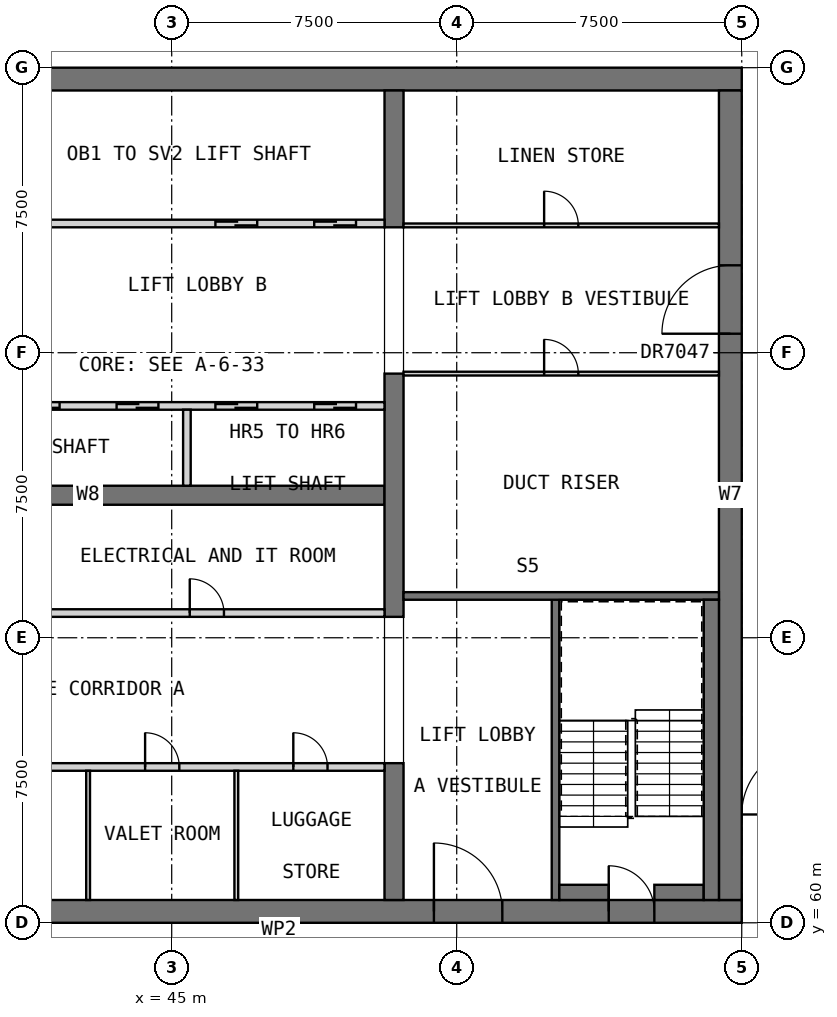
"""IFC4 building model, lengths in metres.
Left out: names, types, materials, properties, quantities, classifications, styles, units other than length and angle.
Written with IfcOpenShell. Run it as: python <this file> out.ifc"""

import sys

from ifc_helpers import new_model, si_unit, direction, frame, frame_2d, origin, place, context, subcontext, project, spatial, rectangle, extrude, element, fill, save


model = new_model("IFC4")
c1 = context("Model", 3, precision=1e-05, world=origin(), true_north=direction((0.0, 1.0)))
c2 = subcontext(c1, "Body", "Model", "MODEL_VIEW")
j1 = project(units=[si_unit("LENGTHUNIT", "METRE"), si_unit("PLANEANGLEUNIT", "RADIAN")], contexts=[c1])
p1 = place(None, origin())
s1 = spatial("IfcSite", under=j1, at=p1, CompositionType="ELEMENT")
p2 = place(p1, origin())
s2 = spatial("IfcBuilding", under=s1, at=p2, CompositionType="ELEMENT")
p3 = place(p2, frame((0.0, 0.0, 230.2)))
s3 = spatial("IfcBuildingStorey", under=s2, at=p3, CompositionType="ELEMENT", Elevation=230.2)
p4 = place(p3, frame((30.0, 60.3, 0.0), z_axis=(0.0, 0.0, 1.0), x_axis=(1.0, 0.0, 0.0)))
e1 = element("IfcWall", 1, at=p4, inside=s3, PredefinedType="SHEAR", context=c2, shape_type="SweptSolid", body=[
    extrude(rectangle(XDim=30.0, YDim=0.6, at=frame_2d((15.0, 0.0))), origin(), (0.0, 0.0, 1.0), 3.5),
])
p5 = place(p4, frame((21.9, 0.0, 0.0)))
e2 = element("IfcOpeningElement", 2, at=p5, cuts=e1, PredefinedType="OPENING", context=c2, shape_type="SweptSolid", body=[
    extrude(rectangle(XDim=1.8, YDim=2.1, at=frame_2d((0.9, 1.05))), frame((0.0, 0.31, 0.0), z_axis=(0.0, -1.0, 0.0), x_axis=(1.0, 0.0, 0.0)), (0.0, 0.0, 1.0), 0.62),
])
p6 = place(p4, frame((26.5, 0.0, 0.0)))
e3 = element("IfcOpeningElement", 3, at=p6, cuts=e1, PredefinedType="OPENING", context=c2, shape_type="SweptSolid", body=[
    extrude(rectangle(XDim=1.2, YDim=2.1, at=frame_2d((0.6, 1.05))), frame((0.0, 0.31, 0.0), z_axis=(0.0, -1.0, 0.0), x_axis=(1.0, 0.0, 0.0)), (0.0, 0.0, 1.0), 0.62),
])
p7 = place(p3, frame((30.0, 82.2, 0.0), z_axis=(0.0, 0.0, 1.0), x_axis=(1.0, 0.0, 0.0)))
e4 = element("IfcWall", 4, at=p7, inside=s3, PredefinedType="SHEAR", context=c2, shape_type="SweptSolid", body=[
    extrude(rectangle(XDim=30.0, YDim=0.6, at=frame_2d((15.0, 0.0))), origin(), (0.0, 0.0, 1.0), 3.5),
])
p8 = place(p3, frame((59.7, 60.6, 0.0), z_axis=(0.0, 0.0, 1.0), x_axis=(0.0, 1.0, 0.0)))
e5 = element("IfcWall", 5, at=p8, inside=s3, PredefinedType="SHEAR", context=c2, shape_type="SweptSolid", body=[
    extrude(rectangle(XDim=21.3, YDim=0.6, at=frame_2d((10.65, 0.0))), origin(), (0.0, 0.0, 1.0), 3.5),
])
p9 = place(p8, frame((14.9, 0.0, 0.0)))
e6 = element("IfcOpeningElement", 6, at=p9, cuts=e5, PredefinedType="OPENING", context=c2, shape_type="SweptSolid", body=[
    extrude(rectangle(XDim=1.8, YDim=2.1, at=frame_2d((0.9, 1.05))), frame((0.0, 0.31, 0.0), z_axis=(0.0, -1.0, 0.0), x_axis=(1.0, 0.0, 0.0)), (0.0, 0.0, 1.0), 0.62),
])
p10 = place(p3, frame((35.0, 71.25, 0.0), z_axis=(0.0, 0.0, 1.0), x_axis=(1.0, 0.0, 0.0)))
e7 = element("IfcWall", 7, at=p10, inside=s3, PredefinedType="SHEAR", context=c2, shape_type="SweptSolid", body=[
    extrude(rectangle(XDim=15.6, YDim=0.5, at=frame_2d((7.8, 0.0))), origin(), (0.0, 0.0, 1.0), 3.5),
])
p11 = place(p3, frame((50.85, 60.6, 0.0), z_axis=(0.0, 0.0, 1.0), x_axis=(0.0, 1.0, 0.0)))
e8 = element("IfcWall", 8, at=p11, inside=s3, PredefinedType="SHEAR", context=c2, shape_type="SweptSolid", body=[
    extrude(rectangle(XDim=3.6, YDim=0.5, at=frame_2d((1.8, 0.0))), origin(), (0.0, 0.0, 1.0), 3.5),
])
p12 = place(p3, frame((50.85, 68.05, 0.0), z_axis=(0.0, 0.0, 1.0), x_axis=(0.0, 1.0, 0.0)))
e9 = element("IfcWall", 9, at=p12, inside=s3, PredefinedType="SHEAR", context=c2, shape_type="SweptSolid", body=[
    extrude(rectangle(XDim=6.4, YDim=0.5, at=frame_2d((3.2, 0.0))), origin(), (0.0, 0.0, 1.0), 3.5),
])
p13 = place(p3, frame((50.85, 78.3, 0.0), z_axis=(0.0, 0.0, 1.0), x_axis=(0.0, 1.0, 0.0)))
e10 = element("IfcWall", 10, at=p13, inside=s3, PredefinedType="SHEAR", context=c2, shape_type="SweptSolid", body=[
    extrude(rectangle(XDim=3.6, YDim=0.5, at=frame_2d((1.8, 0.0))), origin(), (0.0, 0.0, 1.0), 3.5),
])
p14 = place(p3, frame((35.0, 64.1, 0.0), z_axis=(0.0, 0.0, 1.0), x_axis=(1.0, 0.0, 0.0)))
e11 = element("IfcWall", 11, at=p14, inside=s3, PredefinedType="PARTITIONING", context=c2, shape_type="SweptSolid", body=[
    extrude(rectangle(XDim=15.6, YDim=0.2, at=frame_2d((7.8, 0.0))), origin(), (0.0, 0.0, 1.0), 3.25),
])
p15 = place(p14, frame((1.5, 0.0, 0.0)))
e12 = element("IfcOpeningElement", 12, at=p15, cuts=e11, PredefinedType="OPENING", context=c2, shape_type="SweptSolid", body=[
    extrude(rectangle(XDim=0.9, YDim=2.1, at=frame_2d((0.45, 1.05))), frame((0.0, 0.11, 0.0), z_axis=(0.0, -1.0, 0.0), x_axis=(1.0, 0.0, 0.0)), (0.0, 0.0, 1.0), 0.22),
])
p16 = place(p14, frame((5.4, 0.0, 0.0)))
e13 = element("IfcOpeningElement", 13, at=p16, cuts=e11, PredefinedType="OPENING", context=c2, shape_type="SweptSolid", body=[
    extrude(rectangle(XDim=0.9, YDim=2.1, at=frame_2d((0.45, 1.05))), frame((0.0, 0.11, 0.0), z_axis=(0.0, -1.0, 0.0), x_axis=(1.0, 0.0, 0.0)), (0.0, 0.0, 1.0), 0.22),
])
p17 = place(p14, frame((9.3, 0.0, 0.0)))
e14 = element("IfcOpeningElement", 14, at=p17, cuts=e11, PredefinedType="OPENING", context=c2, shape_type="SweptSolid", body=[
    extrude(rectangle(XDim=0.9, YDim=2.1, at=frame_2d((0.45, 1.05))), frame((0.0, 0.11, 0.0), z_axis=(0.0, -1.0, 0.0), x_axis=(1.0, 0.0, 0.0)), (0.0, 0.0, 1.0), 0.22),
])
p18 = place(p14, frame((13.2, 0.0, 0.0)))
e15 = element("IfcOpeningElement", 15, at=p18, cuts=e11, PredefinedType="OPENING", context=c2, shape_type="SweptSolid", body=[
    extrude(rectangle(XDim=0.9, YDim=2.1, at=frame_2d((0.45, 1.05))), frame((0.0, 0.11, 0.0), z_axis=(0.0, -1.0, 0.0), x_axis=(1.0, 0.0, 0.0)), (0.0, 0.0, 1.0), 0.22),
])
for number, where, z_axis, x_axis in (
    (16, (42.8, 60.6, 0.0), (0.0, 0.0, 1.0), (0.0, 1.0, 0.0)),
    (17, (46.7, 60.6, 0.0), (0.0, 0.0, 1.0), (0.0, 1.0, 0.0)),
):
    element("IfcWall", number, at=place(p3, frame(where, z_axis=z_axis, x_axis=x_axis)), inside=s3, PredefinedType="PARTITIONING", context=c2, shape_type="SweptSolid", body=[
        extrude(rectangle(XDim=3.4, YDim=0.1, at=frame_2d((1.7, 0.0))), origin(), (0.0, 0.0, 1.0), 3.25),
    ])
p19 = place(p3, frame((35.0, 68.15, 0.0), z_axis=(0.0, 0.0, 1.0), x_axis=(1.0, 0.0, 0.0)))
e18 = element("IfcWall", 18, at=p19, inside=s3, PredefinedType="PARTITIONING", context=c2, shape_type="SweptSolid", body=[
    extrude(rectangle(XDim=15.6, YDim=0.2, at=frame_2d((7.8, 0.0))), origin(), (0.0, 0.0, 1.0), 3.25),
])
p20 = place(p19, frame((2.675, 0.0, 0.0)))
e19 = element("IfcOpeningElement", 19, at=p20, cuts=e18, PredefinedType="OPENING", context=c2, shape_type="SweptSolid", body=[
    extrude(rectangle(XDim=0.9, YDim=2.1, at=frame_2d((0.45, 1.05))), frame((0.0, 0.11, 0.0), z_axis=(0.0, -1.0, 0.0), x_axis=(1.0, 0.0, 0.0)), (0.0, 0.0, 1.0), 0.22),
])
p21 = place(p19, frame((10.475, 0.0, 0.0)))
e20 = element("IfcOpeningElement", 20, at=p21, cuts=e18, PredefinedType="OPENING", context=c2, shape_type="SweptSolid", body=[
    extrude(rectangle(XDim=0.9, YDim=2.1, at=frame_2d((0.45, 1.05))), frame((0.0, 0.11, 0.0), z_axis=(0.0, -1.0, 0.0), x_axis=(1.0, 0.0, 0.0)), (0.0, 0.0, 1.0), 0.22),
])
p22 = place(p3, frame((35.0, 73.6, 0.0), z_axis=(0.0, 0.0, 1.0), x_axis=(1.0, 0.0, 0.0)))
e21 = element("IfcWall", 21, at=p22, inside=s3, PredefinedType="SOLIDWALL", context=c2, shape_type="SweptSolid", body=[
    extrude(rectangle(XDim=15.6, YDim=0.2, at=frame_2d((7.8, 0.0))), origin(), (0.0, 0.0, 1.0), 3.5),
])
p23 = place(p22, frame((0.75, 0.0, 0.0)))
e22 = element("IfcOpeningElement", 22, at=p23, cuts=e21, PredefinedType="OPENING", context=c2, shape_type="SweptSolid", body=[
    extrude(rectangle(XDim=1.1, YDim=2.1, at=frame_2d((0.55, 1.05))), frame((0.0, 0.11, 0.0), z_axis=(0.0, -1.0, 0.0), x_axis=(1.0, 0.0, 0.0)), (0.0, 0.0, 1.0), 0.22),
])
p24 = place(p22, frame((3.35, 0.0, 0.0)))
e23 = element("IfcOpeningElement", 23, at=p24, cuts=e21, PredefinedType="OPENING", context=c2, shape_type="SweptSolid", body=[
    extrude(rectangle(XDim=1.1, YDim=2.1, at=frame_2d((0.55, 1.05))), frame((0.0, 0.11, 0.0), z_axis=(0.0, -1.0, 0.0), x_axis=(1.0, 0.0, 0.0)), (0.0, 0.0, 1.0), 0.22),
])
p25 = place(p22, frame((5.95, 0.0, 0.0)))
e24 = element("IfcOpeningElement", 24, at=p25, cuts=e21, PredefinedType="OPENING", context=c2, shape_type="SweptSolid", body=[
    extrude(rectangle(XDim=1.1, YDim=2.1, at=frame_2d((0.55, 1.05))), frame((0.0, 0.11, 0.0), z_axis=(0.0, -1.0, 0.0), x_axis=(1.0, 0.0, 0.0)), (0.0, 0.0, 1.0), 0.22),
])
p26 = place(p22, frame((8.55, 0.0, 0.0)))
e25 = element("IfcOpeningElement", 25, at=p26, cuts=e21, PredefinedType="OPENING", context=c2, shape_type="SweptSolid", body=[
    extrude(rectangle(XDim=1.1, YDim=2.1, at=frame_2d((0.55, 1.05))), frame((0.0, 0.11, 0.0), z_axis=(0.0, -1.0, 0.0), x_axis=(1.0, 0.0, 0.0)), (0.0, 0.0, 1.0), 0.22),
])
p27 = place(p22, frame((11.15, 0.0, 0.0)))
e26 = element("IfcOpeningElement", 26, at=p27, cuts=e21, PredefinedType="OPENING", context=c2, shape_type="SweptSolid", body=[
    extrude(rectangle(XDim=1.1, YDim=2.1, at=frame_2d((0.55, 1.05))), frame((0.0, 0.11, 0.0), z_axis=(0.0, -1.0, 0.0), x_axis=(1.0, 0.0, 0.0)), (0.0, 0.0, 1.0), 0.22),
])
p28 = place(p22, frame((13.75, 0.0, 0.0)))
e27 = element("IfcOpeningElement", 27, at=p28, cuts=e21, PredefinedType="OPENING", context=c2, shape_type="SweptSolid", body=[
    extrude(rectangle(XDim=1.1, YDim=2.1, at=frame_2d((0.55, 1.05))), frame((0.0, 0.11, 0.0), z_axis=(0.0, -1.0, 0.0), x_axis=(1.0, 0.0, 0.0)), (0.0, 0.0, 1.0), 0.22),
])
p29 = place(p3, frame((45.4, 71.5, 0.0), z_axis=(0.0, 0.0, 1.0), x_axis=(0.0, 1.0, 0.0)))
e28 = element("IfcWall", 28, at=p29, inside=s3, PredefinedType="SOLIDWALL", context=c2, shape_type="SweptSolid", body=[
    extrude(rectangle(XDim=2.0, YDim=0.2, at=frame_2d((1.0, 0.0))), origin(), (0.0, 0.0, 1.0), 3.5),
])
p30 = place(p3, frame((35.0, 78.4, 0.0), z_axis=(0.0, 0.0, 1.0), x_axis=(1.0, 0.0, 0.0)))
e29 = element("IfcWall", 29, at=p30, inside=s3, PredefinedType="SOLIDWALL", context=c2, shape_type="SweptSolid", body=[
    extrude(rectangle(XDim=15.6, YDim=0.2, at=frame_2d((7.8, 0.0))), origin(), (0.0, 0.0, 1.0), 3.5),
])
p31 = place(p30, frame((0.75, 0.0, 0.0)))
e30 = element("IfcOpeningElement", 30, at=p31, cuts=e29, PredefinedType="OPENING", context=c2, shape_type="SweptSolid", body=[
    extrude(rectangle(XDim=1.1, YDim=2.1, at=frame_2d((0.55, 1.05))), frame((0.0, 0.11, 0.0), z_axis=(0.0, -1.0, 0.0), x_axis=(1.0, 0.0, 0.0)), (0.0, 0.0, 1.0), 0.22),
])
p32 = place(p30, frame((3.35, 0.0, 0.0)))
e31 = element("IfcOpeningElement", 31, at=p32, cuts=e29, PredefinedType="OPENING", context=c2, shape_type="SweptSolid", body=[
    extrude(rectangle(XDim=1.1, YDim=2.1, at=frame_2d((0.55, 1.05))), frame((0.0, 0.11, 0.0), z_axis=(0.0, -1.0, 0.0), x_axis=(1.0, 0.0, 0.0)), (0.0, 0.0, 1.0), 0.22),
])
p33 = place(p30, frame((11.15, 0.0, 0.0)))
e32 = element("IfcOpeningElement", 32, at=p33, cuts=e29, PredefinedType="OPENING", context=c2, shape_type="SweptSolid", body=[
    extrude(rectangle(XDim=1.1, YDim=2.1, at=frame_2d((0.55, 1.05))), frame((0.0, 0.11, 0.0), z_axis=(0.0, -1.0, 0.0), x_axis=(1.0, 0.0, 0.0)), (0.0, 0.0, 1.0), 0.22),
])
p34 = place(p30, frame((13.75, 0.0, 0.0)))
e33 = element("IfcOpeningElement", 33, at=p34, cuts=e29, PredefinedType="OPENING", context=c2, shape_type="SweptSolid", body=[
    extrude(rectangle(XDim=1.1, YDim=2.1, at=frame_2d((0.55, 1.05))), frame((0.0, 0.11, 0.0), z_axis=(0.0, -1.0, 0.0), x_axis=(1.0, 0.0, 0.0)), (0.0, 0.0, 1.0), 0.22),
])
p35 = place(p3, frame((55.1, 60.6, 0.0), z_axis=(0.0, 0.0, 1.0), x_axis=(0.0, 1.0, 0.0)))
e34 = element("IfcWall", 34, at=p35, inside=s3, PredefinedType="SOLIDWALL", context=c2, shape_type="SweptSolid", body=[
    extrude(rectangle(XDim=8.0, YDim=0.2, at=frame_2d((4.0, 0.0))), origin(), (0.0, 0.0, 1.0), 3.25),
])
p36 = place(p3, frame((51.1, 68.6, 0.0), z_axis=(0.0, 0.0, 1.0), x_axis=(1.0, 0.0, 0.0)))
e35 = element("IfcWall", 35, at=p36, inside=s3, PredefinedType="SOLIDWALL", context=c2, shape_type="SweptSolid", body=[
    extrude(rectangle(XDim=8.3, YDim=0.2, at=frame_2d((4.15, 0.0))), origin(), (0.0, 0.0, 1.0), 3.25),
])
for number, where, z_axis, x_axis in (
    (36, (55.2, 60.8, 0.0), (0.0, 0.0, 1.0), (1.0, 0.0, 0.0)),
    (37, (57.7, 60.8, 0.0), (0.0, 0.0, 1.0), (1.0, 0.0, 0.0)),
):
    element("IfcWall", number, at=place(p3, frame(where, z_axis=z_axis, x_axis=x_axis)), inside=s3, PredefinedType="SOLIDWALL", context=c2, shape_type="SweptSolid", body=[
        extrude(rectangle(XDim=1.3, YDim=0.4, at=frame_2d((0.65, 0.0))), origin(), (0.0, 0.0, 1.0), 3.25),
    ])
p37 = place(p3, frame((59.2, 60.6, 0.0), z_axis=(0.0, 0.0, 1.0), x_axis=(0.0, 1.0, 0.0)))
e38 = element("IfcWall", 38, at=p37, inside=s3, PredefinedType="SOLIDWALL", context=c2, shape_type="SweptSolid", body=[
    extrude(rectangle(XDim=7.9, YDim=0.4, at=frame_2d((3.95, 0.0))), origin(), (0.0, 0.0, 1.0), 3.25),
])
p38 = place(p3, frame((51.1, 74.45, 0.0), z_axis=(0.0, 0.0, 1.0), x_axis=(1.0, 0.0, 0.0)))
e39 = element("IfcWall", 39, at=p38, inside=s3, PredefinedType="PARTITIONING", context=c2, shape_type="SweptSolid", body=[
    extrude(rectangle(XDim=8.3, YDim=0.1, at=frame_2d((4.15, 0.0))), origin(), (0.0, 0.0, 1.0), 3.25),
])
p39 = place(p38, frame((3.7, 0.0, 0.0)))
e40 = element("IfcOpeningElement", 40, at=p39, cuts=e39, PredefinedType="OPENING", context=c2, shape_type="SweptSolid", body=[
    extrude(rectangle(XDim=0.9, YDim=2.1, at=frame_2d((0.45, 1.05))), frame((0.0, 0.06, 0.0), z_axis=(0.0, -1.0, 0.0), x_axis=(1.0, 0.0, 0.0)), (0.0, 0.0, 1.0), 0.12),
])
p40 = place(p3, frame((51.1, 78.35, 0.0), z_axis=(0.0, 0.0, 1.0), x_axis=(1.0, 0.0, 0.0)))
e41 = element("IfcWall", 41, at=p40, inside=s3, PredefinedType="PARTITIONING", context=c2, shape_type="SweptSolid", body=[
    extrude(rectangle(XDim=8.3, YDim=0.1, at=frame_2d((4.15, 0.0))), origin(), (0.0, 0.0, 1.0), 3.25),
])
p41 = place(p40, frame((3.7, 0.0, 0.0)))
e42 = element("IfcOpeningElement", 42, at=p41, cuts=e41, PredefinedType="OPENING", context=c2, shape_type="SweptSolid", body=[
    extrude(rectangle(XDim=0.9, YDim=2.1, at=frame_2d((0.45, 1.05))), frame((0.0, 0.06, 0.0), z_axis=(0.0, -1.0, 0.0), x_axis=(1.0, 0.0, 0.0)), (0.0, 0.0, 1.0), 0.12),
])
p42 = place(p17, origin())
e43 = element("IfcDoor", 43, at=p42, inside=s3, OperationType="SINGLE_SWING_LEFT", PredefinedType="DOOR", context=c2, shape_type="SweptSolid", body=[
    extrude(rectangle(XDim=0.9, YDim=2.1, at=frame_2d((0.45, 1.05))), frame((0.0, 0.025, 0.0), z_axis=(0.0, -1.0, 0.0), x_axis=(1.0, 0.0, 0.0)), (0.0, 0.0, 1.0), 0.05),
])
fill(e14, e43)
p43 = place(p18, origin())
e44 = element("IfcDoor", 44, at=p43, inside=s3, OperationType="SINGLE_SWING_RIGHT", PredefinedType="DOOR", context=c2, shape_type="SweptSolid", body=[
    extrude(rectangle(XDim=0.9, YDim=2.1, at=frame_2d((0.45, 1.05))), frame((0.0, 0.025, 0.0), z_axis=(0.0, -1.0, 0.0), x_axis=(1.0, 0.0, 0.0)), (0.0, 0.0, 1.0), 0.05),
])
fill(e15, e44)
p44 = place(p21, origin())
e45 = element("IfcDoor", 45, at=p44, inside=s3, OperationType="SINGLE_SWING_RIGHT", PredefinedType="DOOR", context=c2, shape_type="SweptSolid", body=[
    extrude(rectangle(XDim=0.9, YDim=2.1, at=frame_2d((0.45, 1.05))), frame((0.0, 0.025, 0.0), z_axis=(0.0, -1.0, 0.0), x_axis=(1.0, 0.0, 0.0)), (0.0, 0.0, 1.0), 0.05),
])
fill(e20, e45)
p45 = place(p25, origin())
e46 = element("IfcDoor", 46, at=p45, inside=s3, OperationType="DOUBLE_DOOR_SLIDING", PredefinedType="DOOR", context=c2, shape_type="SweptSolid", body=[
    extrude(rectangle(XDim=1.1, YDim=2.1, at=frame_2d((0.55, 1.05))), frame((0.0, 0.025, 0.0), z_axis=(0.0, -1.0, 0.0), x_axis=(1.0, 0.0, 0.0)), (0.0, 0.0, 1.0), 0.05),
])
fill(e24, e46)
p46 = place(p26, origin())
e47 = element("IfcDoor", 47, at=p46, inside=s3, OperationType="DOUBLE_DOOR_SLIDING", PredefinedType="DOOR", context=c2, shape_type="SweptSolid", body=[
    extrude(rectangle(XDim=1.1, YDim=2.1, at=frame_2d((0.55, 1.05))), frame((0.0, 0.025, 0.0), z_axis=(0.0, -1.0, 0.0), x_axis=(1.0, 0.0, 0.0)), (0.0, 0.0, 1.0), 0.05),
])
fill(e25, e47)
p47 = place(p27, origin())
e48 = element("IfcDoor", 48, at=p47, inside=s3, OperationType="DOUBLE_DOOR_SLIDING", PredefinedType="DOOR", context=c2, shape_type="SweptSolid", body=[
    extrude(rectangle(XDim=1.1, YDim=2.1, at=frame_2d((0.55, 1.05))), frame((0.0, 0.025, 0.0), z_axis=(0.0, -1.0, 0.0), x_axis=(1.0, 0.0, 0.0)), (0.0, 0.0, 1.0), 0.05),
])
fill(e26, e48)
p48 = place(p28, origin())
e49 = element("IfcDoor", 49, at=p48, inside=s3, OperationType="DOUBLE_DOOR_SLIDING", PredefinedType="DOOR", context=c2, shape_type="SweptSolid", body=[
    extrude(rectangle(XDim=1.1, YDim=2.1, at=frame_2d((0.55, 1.05))), frame((0.0, 0.025, 0.0), z_axis=(0.0, -1.0, 0.0), x_axis=(1.0, 0.0, 0.0)), (0.0, 0.0, 1.0), 0.05),
])
fill(e27, e49)
p49 = place(p33, origin())
e50 = element("IfcDoor", 50, at=p49, inside=s3, OperationType="DOUBLE_DOOR_SLIDING", PredefinedType="DOOR", context=c2, shape_type="SweptSolid", body=[
    extrude(rectangle(XDim=1.1, YDim=2.1, at=frame_2d((0.55, 1.05))), frame((0.0, 0.025, 0.0), z_axis=(0.0, -1.0, 0.0), x_axis=(1.0, 0.0, 0.0)), (0.0, 0.0, 1.0), 0.05),
])
fill(e32, e50)
p50 = place(p34, origin())
e51 = element("IfcDoor", 51, at=p50, inside=s3, OperationType="DOUBLE_DOOR_SLIDING", PredefinedType="DOOR", context=c2, shape_type="SweptSolid", body=[
    extrude(rectangle(XDim=1.1, YDim=2.1, at=frame_2d((0.55, 1.05))), frame((0.0, 0.025, 0.0), z_axis=(0.0, -1.0, 0.0), x_axis=(1.0, 0.0, 0.0)), (0.0, 0.0, 1.0), 0.05),
])
fill(e33, e51)
p51 = place(p5, origin())
e52 = element("IfcDoor", 52, at=p51, inside=s3, OperationType="DOUBLE_DOOR_SINGLE_SWING", PredefinedType="DOOR", context=c2, shape_type="SweptSolid", body=[
    extrude(rectangle(XDim=1.8, YDim=2.1, at=frame_2d((0.9, 1.05))), frame((0.0, 0.025, 0.0), z_axis=(0.0, -1.0, 0.0), x_axis=(1.0, 0.0, 0.0)), (0.0, 0.0, 1.0), 0.05),
])
fill(e2, e52)
p52 = place(p9, origin())
e53 = element("IfcDoor", 53, at=p52, inside=s3, OperationType="DOUBLE_DOOR_SINGLE_SWING", PredefinedType="DOOR", context=c2, shape_type="SweptSolid", body=[
    extrude(rectangle(XDim=1.8, YDim=2.1, at=frame_2d((0.9, 1.05))), frame((0.0, 0.025, 0.0), z_axis=(0.0, -1.0, 0.0), x_axis=(1.0, 0.0, 0.0)), (0.0, 0.0, 1.0), 0.05),
])
fill(e6, e53)
p53 = place(p6, origin())
e54 = element("IfcDoor", 54, at=p53, inside=s3, OperationType="SINGLE_SWING_LEFT", PredefinedType="DOOR", context=c2, shape_type="SweptSolid", body=[
    extrude(rectangle(XDim=1.2, YDim=2.1, at=frame_2d((0.6, 1.05))), frame((0.0, 0.025, 0.0), z_axis=(0.0, -1.0, 0.0), x_axis=(1.0, 0.0, 0.0)), (0.0, 0.0, 1.0), 0.05),
])
fill(e3, e54)
p54 = place(p39, origin())
e55 = element("IfcDoor", 55, at=p54, inside=s3, OperationType="SINGLE_SWING_LEFT", PredefinedType="DOOR", context=c2, shape_type="SweptSolid", body=[
    extrude(rectangle(XDim=0.9, YDim=2.1, at=frame_2d((0.45, 1.05))), frame((0.0, 0.025, 0.0), z_axis=(0.0, -1.0, 0.0), x_axis=(1.0, 0.0, 0.0)), (0.0, 0.0, 1.0), 0.05),
])
fill(e40, e55)
p55 = place(p41, origin())
e56 = element("IfcDoor", 56, at=p55, inside=s3, OperationType="SINGLE_SWING_LEFT", PredefinedType="DOOR", context=c2, shape_type="SweptSolid", body=[
    extrude(rectangle(XDim=0.9, YDim=2.1, at=frame_2d((0.45, 1.05))), frame((0.0, 0.025, 0.0), z_axis=(0.0, -1.0, 0.0), x_axis=(1.0, 0.0, 0.0)), (0.0, 0.0, 1.0), 0.05),
])
fill(e42, e56)
save(model, sys.argv[1])
